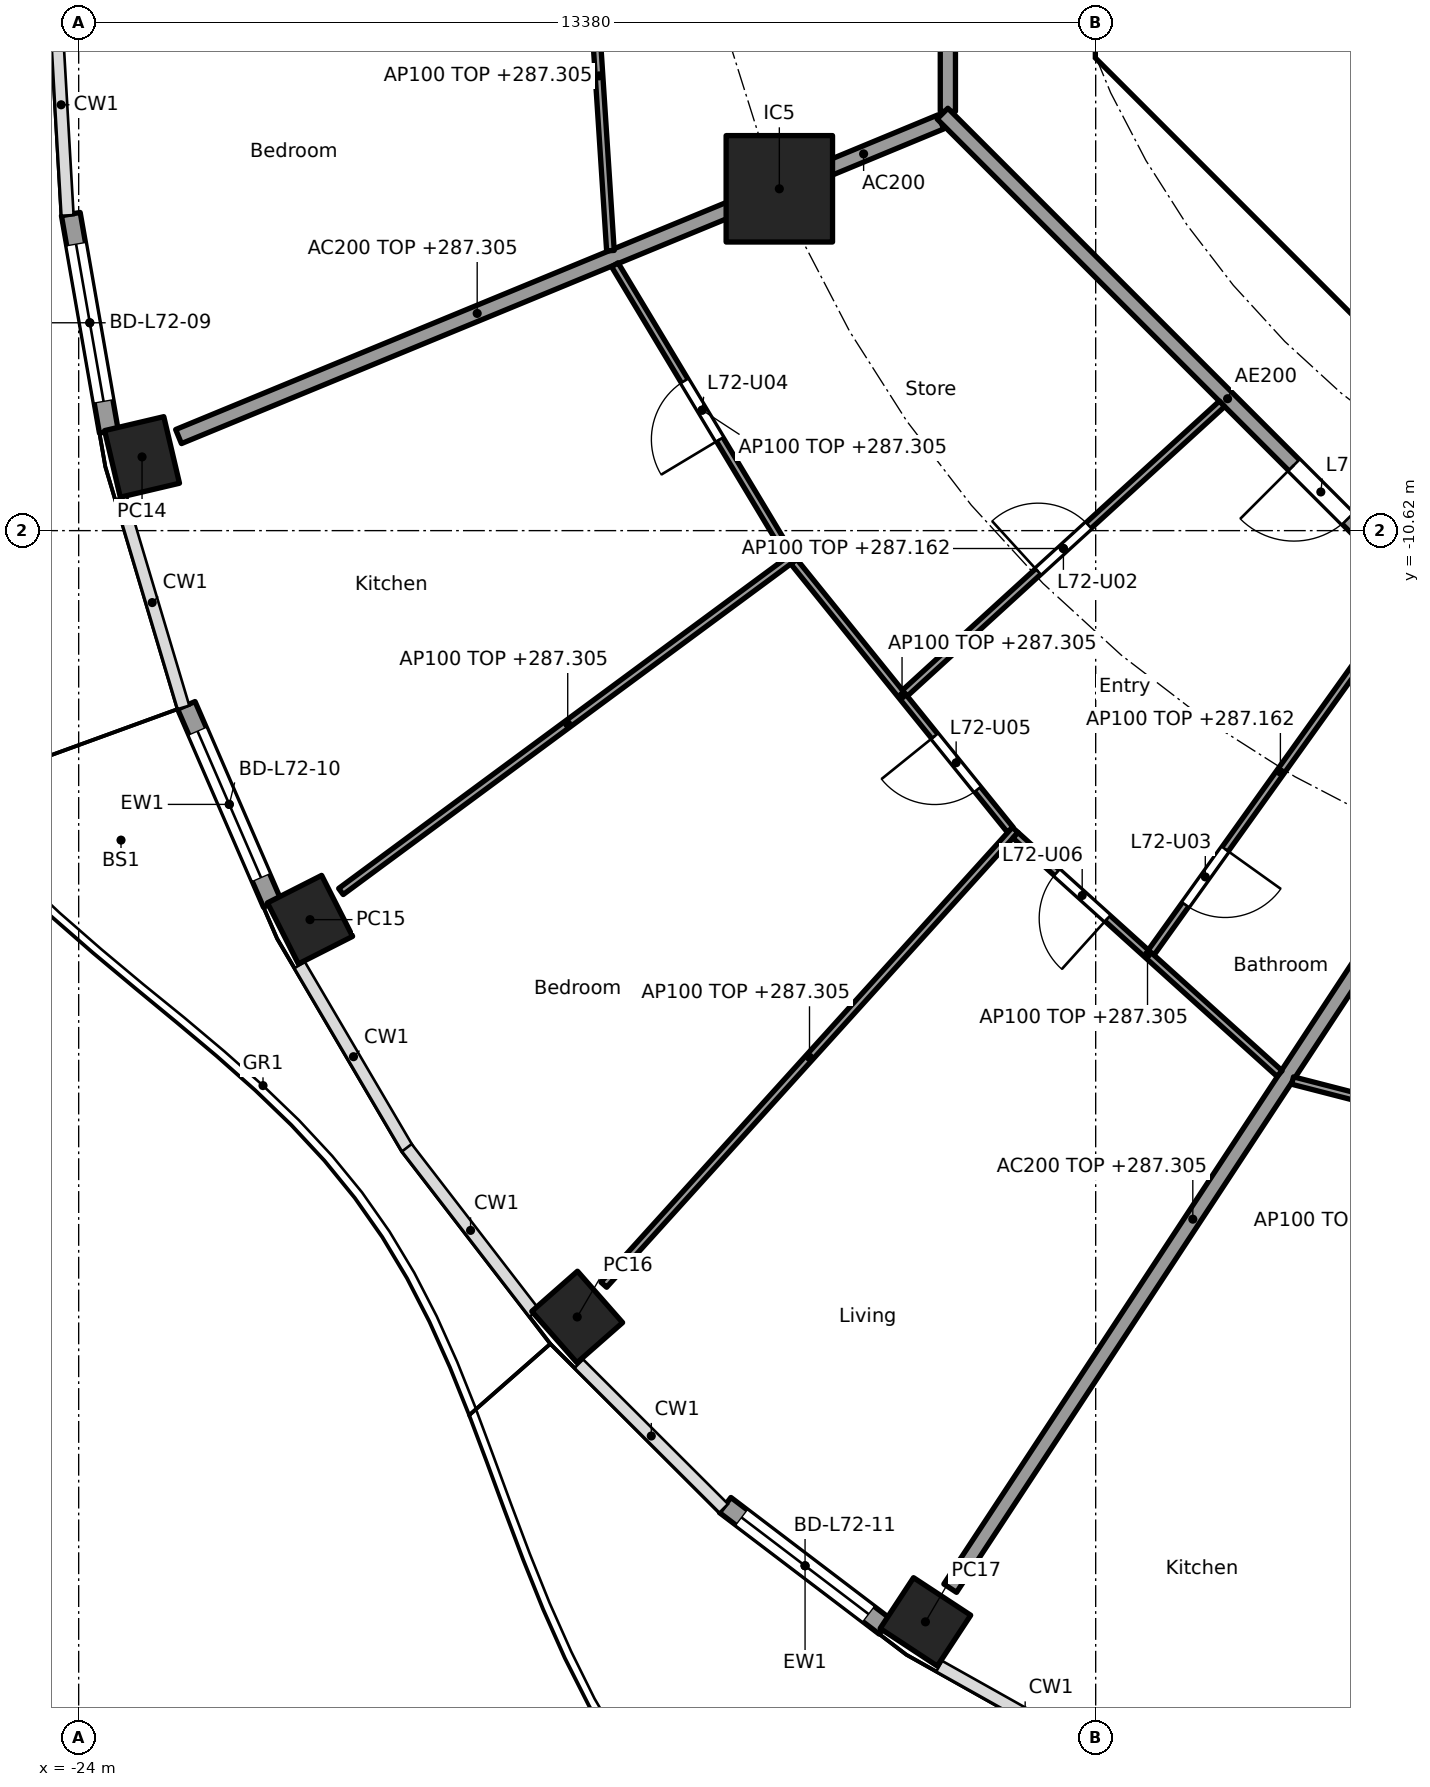
"""IFC4 building model, lengths in metres.
Left out: names, types, materials, properties, quantities, classifications, styles, units other than length and angle.
Written with IfcOpenShell. Run it as: python <this file> out.ifc"""

import sys

from ifc_helpers import new_model, si_unit, direction, frame, frame_2d, origin, origin_2d, place, context, subcontext, project, spatial, polyline, rectangle, hollow_rectangle, outline, extrude, element, fill, save


model = new_model("IFC4")
c1 = context("Model", 3, precision=1e-05, world=origin(), true_north=direction((0.0, 1.0)))
c2 = subcontext(c1, "Body", "Model", "MODEL_VIEW")
j1 = project(units=[si_unit("LENGTHUNIT", "METRE"), si_unit("PLANEANGLEUNIT", "RADIAN")], contexts=[c1])
p1 = place(None, origin())
s1 = spatial("IfcSite", under=j1, at=p1, CompositionType="ELEMENT")
p2 = place(p1, origin())
s2 = spatial("IfcBuilding", under=s1, at=p2, CompositionType="ELEMENT")
p3 = place(p2, frame((0.0, 0.0, 284.4)))
s3 = spatial("IfcBuildingStorey", under=s2, at=p3, CompositionType="ELEMENT", Elevation=284.4)
for number, where, z_axis, x_axis in (
    (1, (-23.166, -9.65, 0.0), (0.0, 0.0, 1.0), (0.229, -0.973, 0.0)),
    (2, (-20.957, -15.738, 0.0), (0.0, 0.0, 1.0), (0.452, -0.892, 0.0)),
    (3, (-17.441, -20.965, 0.0), (0.0, 0.0, 1.0), (0.66, -0.751, 0.0)),
    (4, (-12.86, -24.976, 0.0), (0.0, 0.0, 1.0), (0.836, -0.549, 0.0)),
):
    element("IfcColumn", number, at=place(p3, frame(where, z_axis=z_axis, x_axis=x_axis)), inside=s3, PredefinedType="COLUMN", context=c2, shape_type="SweptSolid", body=[
        extrude(hollow_rectangle(XDim=0.9, YDim=0.8, WallThickness=0.028, at=origin_2d()), origin(), (0.0, 0.0, 1.0), 3.7),
    ])
p4 = place(p3, frame((-14.782, -6.123, 0.0), z_axis=(0.0, 0.0, 1.0), x_axis=(1.0, 0.0, 0.0)))
e5 = element("IfcColumn", 5, at=p4, inside=s3, PredefinedType="COLUMN", context=c2, shape_type="SweptSolid", body=[
    extrude(rectangle(XDim=1.4, YDim=1.4, at=origin_2d()), origin(), (0.0, 0.0, 1.0), 3.7),
])
p5 = place(p3, frame((-23.604, -9.315, 0.0), z_axis=(0.0, 0.0, 1.0), x_axis=(-0.172182411767, 0.985065082661, 0.0)))
e6 = element("IfcWall", 6, at=p5, inside=s3, PredefinedType="SOLIDWALL", context=c2, shape_type="SweptSolid", body=[
    extrude(rectangle(XDim=2.903, YDim=0.25, at=frame_2d((1.451, 0.0))), origin(), (0.0, 0.0, 1.0), 3.44),
])
p6 = place(p5, frame((0.401, 0.0, 0.0)))
e7 = element("IfcOpeningElement", 7, at=p6, cuts=e6, PredefinedType="OPENING", context=c2, shape_type="SweptSolid", body=[
    extrude(rectangle(XDim=2.1, YDim=2.4, at=frame_2d((1.05, 1.2))), frame((0.0, 0.135, 0.0), z_axis=(0.0, -1.0, 0.0), x_axis=(1.0, 0.0, 0.0)), (0.0, 0.0, 1.0), 0.27),
])
p7 = place(p3, frame((-21.454, -15.525, 0.0), z_axis=(0.0, 0.0, 1.0), x_axis=(-0.397597791596, 0.9175598052, 0.0)))
e8 = element("IfcWall", 8, at=p7, inside=s3, PredefinedType="SOLIDWALL", context=c2, shape_type="SweptSolid", body=[
    extrude(rectangle(XDim=2.841, YDim=0.25, at=frame_2d((1.42, 0.0))), origin(), (0.0, 0.0, 1.0), 3.44),
])
p8 = place(p7, frame((0.371, 0.0, 0.0)))
e9 = element("IfcOpeningElement", 9, at=p8, cuts=e8, PredefinedType="OPENING", context=c2, shape_type="SweptSolid", body=[
    extrude(rectangle(XDim=2.1, YDim=2.4, at=frame_2d((1.05, 1.2))), frame((0.0, 0.135, 0.0), z_axis=(0.0, -1.0, 0.0), x_axis=(1.0, 0.0, 0.0)), (0.0, 0.0, 1.0), 0.27),
])
p9 = place(p3, frame((-13.393, -25.037, 0.0), z_axis=(0.0, 0.0, 1.0), x_axis=(-0.796055284084, 0.605223912847, 0.0)))
e10 = element("IfcWall", 10, at=p9, inside=s3, PredefinedType="SOLIDWALL", context=c2, shape_type="SweptSolid", body=[
    extrude(rectangle(XDim=2.641, YDim=0.25, at=frame_2d((1.32, 0.0))), origin(), (0.0, 0.0, 1.0), 3.44),
])
p10 = place(p9, frame((0.27, 0.0, 0.0)))
e11 = element("IfcOpeningElement", 11, at=p10, cuts=e10, PredefinedType="OPENING", context=c2, shape_type="SweptSolid", body=[
    extrude(rectangle(XDim=2.1, YDim=2.4, at=frame_2d((1.05, 1.2))), frame((0.0, 0.135, 0.0), z_axis=(0.0, -1.0, 0.0), x_axis=(1.0, 0.0, 0.0)), (0.0, 0.0, 1.0), 0.27),
])
p11 = place(p3, frame((-9.988, -4.613, 0.0), z_axis=(0.0, 0.0, 1.0), x_axis=(0.707106781187, -0.707106781187, 0.0)))
e12 = element("IfcWall", 12, at=p11, inside=s3, PredefinedType="SHEAR", context=c2, shape_type="SweptSolid", body=[
    extrude(rectangle(XDim=7.602, YDim=0.6, at=frame_2d((3.801, 0.0))), origin(), (0.0, 0.0, 1.0), 3.44),
])
p12 = place(p11, frame((6.151, 0.0, 0.0)))
e13 = element("IfcOpeningElement", 13, at=p12, cuts=e12, PredefinedType="OPENING", context=c2, shape_type="SweptSolid", body=[
    extrude(rectangle(XDim=1.1, YDim=2.1, at=frame_2d((0.55, 1.05))), frame((0.0, 0.31, 0.0), z_axis=(0.0, -1.0, 0.0), x_axis=(1.0, 0.0, 0.0)), (0.0, 0.0, 1.0), 0.62),
])
p13 = place(p3, origin())
e14 = element("IfcWall", 14, at=p13, inside=s3, PredefinedType="SHEAR", context=c2, shape_type="SweptSolid", body=[
    extrude(outline(polyline([(-10.625, -3.801), (-10.025, -3.801), (-10.025, -4.152), (-9.776, -4.401), (-10.2, -4.825), (-10.625, -4.401), (-10.625, -3.801)])), origin(), (0.0, 0.0, 1.0), 3.44),
])
p14 = place(p3, frame((-8.301, -5.8, 0.0), z_axis=(0.0, 0.0, 1.0), x_axis=(1.0, 0.0, 0.0)))
e15 = element("IfcWall", 15, at=p14, inside=s3, PredefinedType="PARTITIONING", context=c2, shape_type="SweptSolid", body=[
    extrude(rectangle(XDim=2.026, YDim=0.15, at=frame_2d((1.013, 0.0))), origin(), (0.0, 0.0, 1.0), 3.44),
])
p15 = place(p3, frame((-12.657, -5.243, 0.0), z_axis=(0.0, 0.0, 1.0), x_axis=(-0.923859888513, -0.38273085373, 0.0)))
e16 = element("IfcWall", 16, at=p15, inside=s3, PredefinedType="PARTITIONING", context=c2, shape_type="SweptSolid", body=[
    extrude(rectangle(XDim=2.199, YDim=0.2, at=frame_2d((1.1, 0.0))), origin(), (0.0, 0.0, 1.0), 3.44),
])
p16 = place(p3, frame((-14.828, -6.142, 0.0), z_axis=(0.0, 0.0, 1.0), x_axis=(-0.924478087429, -0.381235184451, 0.0)))
e17 = element("IfcWall", 17, at=p16, inside=s3, PredefinedType="PARTITIONING", context=c2, shape_type="SweptSolid", body=[
    extrude(rectangle(XDim=8.499, YDim=0.2, at=frame_2d((4.25, 0.0))), origin(), (0.0, 0.0, 1.0), 2.905),
])
p17 = place(p3, frame((-6.151, -14.824, 0.0), z_axis=(0.0, 0.0, 1.0), x_axis=(-0.549345577828, -0.835595258556, 0.0)))
e18 = element("IfcWall", 18, at=p17, inside=s3, PredefinedType="PARTITIONING", context=c2, shape_type="SweptSolid", body=[
    extrude(rectangle(XDim=11.62, YDim=0.2, at=frame_2d((5.81, 0.0))), origin(), (0.0, 0.0, 1.0), 2.905),
])
p18 = place(p3, frame((-12.565, 5.304, 0.0), z_axis=(0.0, 0.0, 1.0), x_axis=(0.0, -1.0, 0.0)))
e19 = element("IfcWall", 19, at=p18, inside=s3, PredefinedType="PARTITIONING", context=c2, shape_type="SweptSolid", body=[
    extrude(rectangle(XDim=10.409, YDim=0.2, at=frame_2d((5.205, 0.0))), origin(), (0.0, 0.0, 1.0), 3.44),
])
p19 = place(p18, frame((4.804, 0.0, 0.0)))
e20 = element("IfcOpeningElement", 20, at=p19, cuts=e19, PredefinedType="OPENING", context=c2, shape_type="SweptSolid", body=[
    extrude(rectangle(XDim=1.0, YDim=2.1, at=frame_2d((0.5, 1.05))), frame((0.0, 0.11, 0.0), z_axis=(0.0, -1.0, 0.0), x_axis=(1.0, 0.0, 0.0)), (0.0, 0.0, 1.0), 0.22),
])
p20 = place(p3, frame((-12.635, -5.134, 0.0), z_axis=(0.0, 0.0, 1.0), x_axis=(0.707106781187, -0.707106781187, 0.0)))
e21 = element("IfcWall", 21, at=p20, inside=s3, PredefinedType="PARTITIONING", context=c2, shape_type="SweptSolid", body=[
    extrude(rectangle(XDim=10.609, YDim=0.2, at=frame_2d((5.305, 0.0))), origin(), (0.0, 0.0, 1.0), 3.44),
])
p21 = place(p20, frame((6.539, 0.0, 0.0)))
e22 = element("IfcOpeningElement", 22, at=p21, cuts=e21, PredefinedType="OPENING", context=c2, shape_type="SweptSolid", body=[
    extrude(rectangle(XDim=1.0, YDim=2.1, at=frame_2d((0.5, 1.05))), frame((0.0, 0.11, 0.0), z_axis=(0.0, -1.0, 0.0), x_axis=(1.0, 0.0, 0.0)), (0.0, 0.0, 1.0), 0.22),
])
p22 = place(p3, frame((-17.304, -2.338, 0.0), z_axis=(0.0, 0.0, 1.0), x_axis=(0.06500001157, -0.997885263192, 0.0)))
e23 = element("IfcWall", 23, at=p22, inside=s3, PredefinedType="PARTITIONING", context=c2, shape_type="SweptSolid", body=[
    extrude(rectangle(XDim=4.609, YDim=0.1, at=frame_2d((2.304, 0.0))), origin(), (0.0, 0.0, 1.0), 2.905),
])
p23 = place(p3, frame((-16.946, -7.122, 0.0), z_axis=(0.0, 0.0, 1.0), x_axis=(0.514994556856, -0.857193447483, 0.0)))
e24 = element("IfcWall", 24, at=p23, inside=s3, PredefinedType="PARTITIONING", context=c2, shape_type="SweptSolid", body=[
    extrude(rectangle(XDim=4.462, YDim=0.1, at=frame_2d((2.231, 0.0))), origin(), (0.0, 0.0, 1.0), 2.905),
])
p24 = place(p23, frame((1.781, 0.0, 0.0)))
e25 = element("IfcOpeningElement", 25, at=p24, cuts=e24, PredefinedType="OPENING", context=c2, shape_type="SweptSolid", body=[
    extrude(rectangle(XDim=0.9, YDim=2.1, at=frame_2d((0.45, 1.05))), frame((0.0, 0.06, 0.0), z_axis=(0.0, -1.0, 0.0), x_axis=(1.0, 0.0, 0.0)), (0.0, 0.0, 1.0), 0.12),
])
p25 = place(p3, frame((-14.582, -10.96, 0.0), z_axis=(0.0, 0.0, 1.0), x_axis=(-0.804405200554, -0.594081032623, 0.0)))
e26 = element("IfcWall", 26, at=p25, inside=s3, PredefinedType="PARTITIONING", context=c2, shape_type="SweptSolid", body=[
    extrude(rectangle(XDim=7.418, YDim=0.1, at=frame_2d((3.709, 0.0))), origin(), (0.0, 0.0, 1.0), 2.905),
])
p26 = place(p3, frame((-14.591, -11.029, 0.0), z_axis=(0.0, 0.0, 1.0), x_axis=(0.628170338674, -0.778075848237, 0.0)))
e27 = element("IfcWall", 27, at=p26, inside=s3, PredefinedType="PARTITIONING", context=c2, shape_type="SweptSolid", body=[
    extrude(rectangle(XDim=4.532, YDim=0.1, at=frame_2d((2.266, 0.0))), origin(), (0.0, 0.0, 1.0), 2.905),
])
p27 = place(p26, frame((2.949, 0.0, 0.0)))
e28 = element("IfcOpeningElement", 28, at=p27, cuts=e27, PredefinedType="OPENING", context=c2, shape_type="SweptSolid", body=[
    extrude(rectangle(XDim=0.9, YDim=2.1, at=frame_2d((0.45, 1.05))), frame((0.0, 0.06, 0.0), z_axis=(0.0, -1.0, 0.0), x_axis=(1.0, 0.0, 0.0)), (0.0, 0.0, 1.0), 0.12),
])
p28 = place(p3, frame((-8.958, -8.952, 0.0), z_axis=(0.0, 0.0, 1.0), x_axis=(-0.73876526954, -0.673962815385, 0.0)))
e29 = element("IfcWall", 29, at=p28, inside=s3, PredefinedType="PARTITIONING", context=c2, shape_type="SweptSolid", body=[
    extrude(rectangle(XDim=5.647, YDim=0.1, at=frame_2d((2.824, 0.0))), origin(), (0.0, 0.0, 1.0), 2.762),
])
p29 = place(p28, frame((2.374, 0.0, 0.0)))
e30 = element("IfcOpeningElement", 30, at=p29, cuts=e29, PredefinedType="OPENING", context=c2, shape_type="SweptSolid", body=[
    extrude(rectangle(XDim=0.9, YDim=2.1, at=frame_2d((0.45, 1.05))), frame((0.0, 0.06, 0.0), z_axis=(0.0, -1.0, 0.0), x_axis=(1.0, 0.0, 0.0)), (0.0, 0.0, 1.0), 0.12),
])
p30 = place(p3, frame((-11.679, -14.557, 0.0), z_axis=(0.0, 0.0, 1.0), x_axis=(-0.670800011545, -0.741638284146, 0.0)))
e31 = element("IfcWall", 31, at=p30, inside=s3, PredefinedType="PARTITIONING", context=c2, shape_type="SweptSolid", body=[
    extrude(rectangle(XDim=8.068, YDim=0.1, at=frame_2d((4.034, 0.0))), origin(), (0.0, 0.0, 1.0), 2.905),
])
p31 = place(p3, frame((-11.676, -14.628, 0.0), z_axis=(0.0, 0.0, 1.0), x_axis=(0.74245829867, -0.669892285921, 0.0)))
e32 = element("IfcWall", 32, at=p31, inside=s3, PredefinedType="PARTITIONING", context=c2, shape_type="SweptSolid", body=[
    extrude(rectangle(XDim=4.68, YDim=0.1, at=frame_2d((2.34, 0.0))), origin(), (0.0, 0.0, 1.0), 2.905),
])
p32 = place(p31, frame((0.732, 0.0, 0.0)))
e33 = element("IfcOpeningElement", 33, at=p32, cuts=e32, PredefinedType="OPENING", context=c2, shape_type="SweptSolid", body=[
    extrude(rectangle(XDim=0.9, YDim=2.1, at=frame_2d((0.45, 1.05))), frame((0.0, 0.06, 0.0), z_axis=(0.0, -1.0, 0.0), x_axis=(1.0, 0.0, 0.0)), (0.0, 0.0, 1.0), 0.12),
])
p33 = place(p3, frame((-6.49, -11.419, 0.0), z_axis=(0.0, 0.0, 1.0), x_axis=(-0.58201647594, -0.813176992871, 0.0)))
e34 = element("IfcWall", 34, at=p33, inside=s3, PredefinedType="PARTITIONING", context=c2, shape_type="SweptSolid", body=[
    extrude(rectangle(XDim=5.844, YDim=0.1, at=frame_2d((2.922, 0.0))), origin(), (0.0, 0.0, 1.0), 2.762),
])
p34 = place(p33, frame((4.169, 0.0, 0.0)))
e35 = element("IfcOpeningElement", 35, at=p34, cuts=e34, PredefinedType="OPENING", context=c2, shape_type="SweptSolid", body=[
    extrude(rectangle(XDim=0.9, YDim=2.1, at=frame_2d((0.45, 1.05))), frame((0.0, 0.06, 0.0), z_axis=(0.0, -1.0, 0.0), x_axis=(1.0, 0.0, 0.0)), (0.0, 0.0, 1.0), 0.12),
])
p35 = place(p3, frame((-8.03, -17.854, 0.0), z_axis=(0.0, 0.0, 1.0), x_axis=(0.968441967324, -0.249239154077, 0.0)))
e36 = element("IfcWall", 36, at=p35, inside=s3, PredefinedType="PARTITIONING", context=c2, shape_type="SweptSolid", body=[
    extrude(rectangle(XDim=3.468, YDim=0.1, at=frame_2d((1.734, 0.0))), origin(), (0.0, 0.0, 1.0), 2.905),
])
p36 = place(p35, frame((1.284, 0.0, 0.0)))
e37 = element("IfcOpeningElement", 37, at=p36, cuts=e36, PredefinedType="OPENING", context=c2, shape_type="SweptSolid", body=[
    extrude(rectangle(XDim=0.9, YDim=2.1, at=frame_2d((0.45, 1.05))), frame((0.0, 0.06, 0.0), z_axis=(0.0, -1.0, 0.0), x_axis=(1.0, 0.0, 0.0)), (0.0, 0.0, 1.0), 0.12),
])
p37 = place(p3, frame((-2.633, -12.66, 0.0), z_axis=(0.0, 0.0, 1.0), x_axis=(-0.311432955908, -0.950268127412, 0.0)))
e38 = element("IfcWall", 38, at=p37, inside=s3, PredefinedType="PARTITIONING", context=c2, shape_type="SweptSolid", body=[
    extrude(rectangle(XDim=15.074, YDim=0.1, at=frame_2d((7.537, 0.0))), origin(), (0.0, 0.0, 1.0), 2.762),
])
p38 = place(p37, frame((0.829, 0.0, 0.0)))
e39 = element("IfcOpeningElement", 39, at=p38, cuts=e38, PredefinedType="OPENING", context=c2, shape_type="SweptSolid", body=[
    extrude(rectangle(XDim=0.9, YDim=2.1, at=frame_2d((0.45, 1.05))), frame((0.0, 0.06, 0.0), z_axis=(0.0, -1.0, 0.0), x_axis=(1.0, 0.0, 0.0)), (0.0, 0.0, 1.0), 0.12),
])
p39 = place(p6, origin())
e40 = element("IfcDoor", 40, at=p39, inside=s3, OperationType="SLIDING_TO_LEFT", PredefinedType="DOOR", context=c2, shape_type="SweptSolid", body=[
    extrude(rectangle(XDim=2.1, YDim=2.4, at=frame_2d((1.05, 1.2))), frame((0.0, 0.025, 0.0), z_axis=(0.0, -1.0, 0.0), x_axis=(1.0, 0.0, 0.0)), (0.0, 0.0, 1.0), 0.05),
])
fill(e7, e40)
p40 = place(p8, origin())
e41 = element("IfcDoor", 41, at=p40, inside=s3, OperationType="SLIDING_TO_LEFT", PredefinedType="DOOR", context=c2, shape_type="SweptSolid", body=[
    extrude(rectangle(XDim=2.1, YDim=2.4, at=frame_2d((1.05, 1.2))), frame((0.0, 0.025, 0.0), z_axis=(0.0, -1.0, 0.0), x_axis=(1.0, 0.0, 0.0)), (0.0, 0.0, 1.0), 0.05),
])
fill(e9, e41)
p41 = place(p10, origin())
e42 = element("IfcDoor", 42, at=p41, inside=s3, OperationType="SLIDING_TO_LEFT", PredefinedType="DOOR", context=c2, shape_type="SweptSolid", body=[
    extrude(rectangle(XDim=2.1, YDim=2.4, at=frame_2d((1.05, 1.2))), frame((0.0, 0.025, 0.0), z_axis=(0.0, -1.0, 0.0), x_axis=(1.0, 0.0, 0.0)), (0.0, 0.0, 1.0), 0.05),
])
fill(e11, e42)
p42 = place(p21, frame((1.0, 0.0, 0.0), x_axis=(-1.0, 0.0, 0.0)))
e43 = element("IfcDoor", 43, at=p42, inside=s3, OperationType="SINGLE_SWING_RIGHT", PredefinedType="DOOR", context=c2, shape_type="SweptSolid", body=[
    extrude(rectangle(XDim=1.0, YDim=2.1, at=frame_2d((0.5, 1.05))), frame((0.0, 0.025, 0.0), z_axis=(0.0, -1.0, 0.0), x_axis=(1.0, 0.0, 0.0)), (0.0, 0.0, 1.0), 0.05),
])
fill(e22, e43)
p43 = place(p29, frame((0.9, 0.0, 0.0), x_axis=(-1.0, 0.0, 0.0)))
e44 = element("IfcDoor", 44, at=p43, inside=s3, OperationType="SINGLE_SWING_LEFT", PredefinedType="DOOR", context=c2, shape_type="SweptSolid", body=[
    extrude(rectangle(XDim=0.9, YDim=2.1, at=frame_2d((0.45, 1.05))), frame((0.0, 0.025, 0.0), z_axis=(0.0, -1.0, 0.0), x_axis=(1.0, 0.0, 0.0)), (0.0, 0.0, 1.0), 0.05),
])
fill(e30, e44)
p44 = place(p34, origin())
e45 = element("IfcDoor", 45, at=p44, inside=s3, OperationType="SINGLE_SWING_LEFT", PredefinedType="DOOR", context=c2, shape_type="SweptSolid", body=[
    extrude(rectangle(XDim=0.9, YDim=2.1, at=frame_2d((0.45, 1.05))), frame((0.0, 0.025, 0.0), z_axis=(0.0, -1.0, 0.0), x_axis=(1.0, 0.0, 0.0)), (0.0, 0.0, 1.0), 0.05),
])
fill(e35, e45)
p45 = place(p24, frame((0.9, 0.0, 0.0), x_axis=(-1.0, 0.0, 0.0)))
e46 = element("IfcDoor", 46, at=p45, inside=s3, OperationType="SINGLE_SWING_LEFT", PredefinedType="DOOR", context=c2, shape_type="SweptSolid", body=[
    extrude(rectangle(XDim=0.9, YDim=2.1, at=frame_2d((0.45, 1.05))), frame((0.0, 0.025, 0.0), z_axis=(0.0, -1.0, 0.0), x_axis=(1.0, 0.0, 0.0)), (0.0, 0.0, 1.0), 0.05),
])
fill(e25, e46)
p46 = place(p27, frame((0.9, 0.0, 0.0), x_axis=(-1.0, 0.0, 0.0)))
e47 = element("IfcDoor", 47, at=p46, inside=s3, OperationType="SINGLE_SWING_RIGHT", PredefinedType="DOOR", context=c2, shape_type="SweptSolid", body=[
    extrude(rectangle(XDim=0.9, YDim=2.1, at=frame_2d((0.45, 1.05))), frame((0.0, 0.025, 0.0), z_axis=(0.0, -1.0, 0.0), x_axis=(1.0, 0.0, 0.0)), (0.0, 0.0, 1.0), 0.05),
])
fill(e28, e47)
p47 = place(p32, frame((0.9, 0.0, 0.0), x_axis=(-1.0, 0.0, 0.0)))
e48 = element("IfcDoor", 48, at=p47, inside=s3, OperationType="SINGLE_SWING_LEFT", PredefinedType="DOOR", context=c2, shape_type="SweptSolid", body=[
    extrude(rectangle(XDim=0.9, YDim=2.1, at=frame_2d((0.45, 1.05))), frame((0.0, 0.025, 0.0), z_axis=(0.0, -1.0, 0.0), x_axis=(1.0, 0.0, 0.0)), (0.0, 0.0, 1.0), 0.05),
])
fill(e33, e48)
save(model, sys.argv[1])
